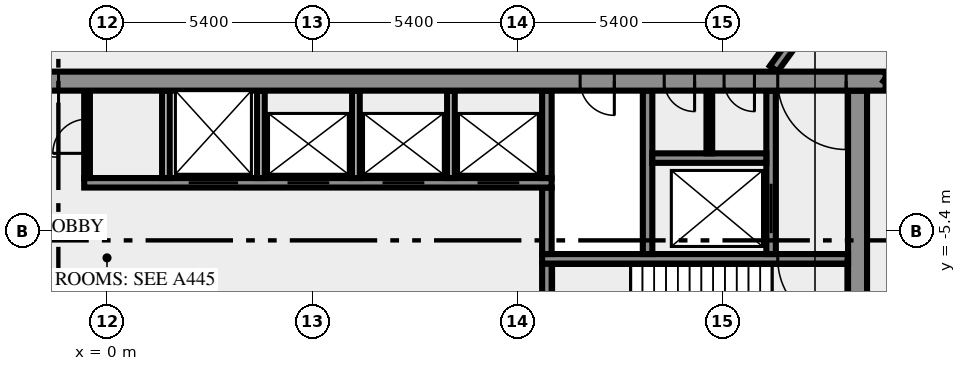
"""IFC4 building model, lengths in metres.
Left out: names, types, materials, properties, quantities, classifications, styles, units other than length and angle.
Written with IfcOpenShell. Run it as: python <this file> out.ifc"""

import sys

from ifc_helpers import new_model, si_unit, direction, frame, frame_2d, origin, place, context, subcontext, project, spatial, rectangle, extrude, element, fill, save


model = new_model("IFC4")
c1 = context("Model", 3, precision=1e-05, world=origin(), true_north=direction((0.0, 1.0)))
c2 = subcontext(c1, "Body", "Model", "MODEL_VIEW")
j1 = project(units=[si_unit("LENGTHUNIT", "METRE"), si_unit("PLANEANGLEUNIT", "RADIAN")], contexts=[c1])
p1 = place(None, origin())
s1 = spatial("IfcSite", under=j1, at=p1, CompositionType="ELEMENT")
p2 = place(p1, origin())
s2 = spatial("IfcBuilding", under=s1, at=p2, CompositionType="ELEMENT")
p3 = place(p2, origin())
s3 = spatial("IfcBuildingStorey", under=s2, at=p3, CompositionType="ELEMENT", Elevation=0.0)
p4 = place(p3, frame((19.75, -11.0, 0.0), z_axis=(0.0, 0.0, 1.0), x_axis=(0.0, 1.0, 0.0)))
e1 = element("IfcWall", 1, at=p4, inside=s3, PredefinedType="SHEAR", context=c2, shape_type="SweptSolid", body=[
    extrude(rectangle(XDim=9.3, YDim=0.5, at=frame_2d((4.65, 0.0))), origin(), (0.0, 0.0, 1.0), 5.6),
])
p5 = place(p3, frame((11.575, -7.25, 0.0), z_axis=(0.0, 0.0, 1.0), x_axis=(0.0, 1.0, 0.0)))
e2 = element("IfcWall", 2, at=p5, inside=s3, PredefinedType="SHEAR", context=c2, shape_type="SweptSolid", body=[
    extrude(rectangle(XDim=1.0, YDim=0.25, at=frame_2d((0.5, 0.0))), origin(), (0.0, 0.0, 1.0), 5.6),
])
p6 = place(p3, frame((19.5, -6.125, 0.0), z_axis=(0.0, 0.0, 1.0), x_axis=(-1.0, 0.0, 0.0)))
e3 = element("IfcWall", 3, at=p6, inside=s3, PredefinedType="SHEAR", context=c2, shape_type="SweptSolid", body=[
    extrude(rectangle(XDim=8.05, YDim=0.25, at=frame_2d((4.025, 0.0))), origin(), (0.0, 0.0, 1.0), 5.6),
])
p7 = place(p6, frame((0.05, 0.0, 0.0)))
e4 = element("IfcOpeningElement", 4, at=p7, cuts=e3, PredefinedType="OPENING", context=c2, shape_type="SweptSolid", body=[
    extrude(rectangle(XDim=1.8, YDim=2.1, at=frame_2d((0.9, 1.05))), frame((0.0, 0.135, 0.0), z_axis=(0.0, -1.0, 0.0), x_axis=(1.0, 0.0, 0.0)), (0.0, 0.0, 1.0), 0.27),
])
p8 = place(p3, frame((11.575, -6.0, 0.0), z_axis=(0.0, 0.0, 1.0), x_axis=(0.0, 1.0, 0.0)))
e5 = element("IfcWall", 5, at=p8, inside=s3, PredefinedType="SHEAR", context=c2, shape_type="SweptSolid", body=[
    extrude(rectangle(XDim=1.75, YDim=0.25, at=frame_2d((0.875, 0.0))), origin(), (0.0, 0.0, 1.0), 5.6),
])
p9 = place(p3, frame((14.225, -6.0, 0.0), z_axis=(0.0, 0.0, 1.0), x_axis=(0.0, 1.0, 0.0)))
e6 = element("IfcWall", 6, at=p9, inside=s3, PredefinedType="SHEAR", context=c2, shape_type="SweptSolid", body=[
    extrude(rectangle(XDim=4.3, YDim=0.25, at=frame_2d((2.15, 0.0))), origin(), (0.0, 0.0, 1.0), 5.6),
])
p10 = place(p3, frame((17.475, -6.0, 0.0), z_axis=(0.0, 0.0, 1.0), x_axis=(0.0, 1.0, 0.0)))
e7 = element("IfcWall", 7, at=p10, inside=s3, PredefinedType="SHEAR", context=c2, shape_type="SweptSolid", body=[
    extrude(rectangle(XDim=4.3, YDim=0.25, at=frame_2d((2.15, 0.0))), origin(), (0.0, 0.0, 1.0), 5.6),
])
p11 = place(p10, frame((0.55, 0.0, 0.0)))
e8 = element("IfcOpeningElement", 8, at=p11, cuts=e7, PredefinedType="OPENING", context=c2, shape_type="SweptSolid", body=[
    extrude(rectangle(XDim=1.3, YDim=2.1, at=frame_2d((0.65, 1.05))), frame((0.0, 0.135, 0.0), z_axis=(0.0, -1.0, 0.0), x_axis=(1.0, 0.0, 0.0)), (0.0, 0.0, 1.0), 0.27),
])
p12 = place(p3, frame((-0.6, -4.125, 0.0), z_axis=(0.0, 0.0, 1.0), x_axis=(1.0, 0.0, 0.0)))
e9 = element("IfcWall", 9, at=p12, inside=s3, PredefinedType="SHEAR", context=c2, shape_type="SweptSolid", body=[
    extrude(rectangle(XDim=12.3, YDim=0.25, at=frame_2d((6.15, 0.0))), origin(), (0.0, 0.0, 1.0), 5.6),
])
p13 = place(p12, frame((2.75, 0.0, 0.0)))
e10 = element("IfcOpeningElement", 10, at=p13, cuts=e9, PredefinedType="OPENING", context=c2, shape_type="SweptSolid", body=[
    extrude(rectangle(XDim=1.3, YDim=2.1, at=frame_2d((0.65, 1.05))), frame((0.0, 0.135, 0.0), z_axis=(0.0, -1.0, 0.0), x_axis=(1.0, 0.0, 0.0)), (0.0, 0.0, 1.0), 0.27),
])
p14 = place(p12, frame((5.35, 0.0, 0.0)))
e11 = element("IfcOpeningElement", 11, at=p14, cuts=e9, PredefinedType="OPENING", context=c2, shape_type="SweptSolid", body=[
    extrude(rectangle(XDim=1.1, YDim=2.1, at=frame_2d((0.55, 1.05))), frame((0.0, 0.135, 0.0), z_axis=(0.0, -1.0, 0.0), x_axis=(1.0, 0.0, 0.0)), (0.0, 0.0, 1.0), 0.27),
])
p15 = place(p12, frame((7.85, 0.0, 0.0)))
e12 = element("IfcOpeningElement", 12, at=p15, cuts=e9, PredefinedType="OPENING", context=c2, shape_type="SweptSolid", body=[
    extrude(rectangle(XDim=1.1, YDim=2.1, at=frame_2d((0.55, 1.05))), frame((0.0, 0.135, 0.0), z_axis=(0.0, -1.0, 0.0), x_axis=(1.0, 0.0, 0.0)), (0.0, 0.0, 1.0), 0.27),
])
p16 = place(p12, frame((10.35, 0.0, 0.0)))
e13 = element("IfcOpeningElement", 13, at=p16, cuts=e9, PredefinedType="OPENING", context=c2, shape_type="SweptSolid", body=[
    extrude(rectangle(XDim=1.1, YDim=2.1, at=frame_2d((0.55, 1.05))), frame((0.0, 0.135, 0.0), z_axis=(0.0, -1.0, 0.0), x_axis=(1.0, 0.0, 0.0)), (0.0, 0.0, 1.0), 0.27),
])
p17 = place(p3, frame((-0.525, -4.0, 0.0), z_axis=(0.0, 0.0, 1.0), x_axis=(0.0, 1.0, 0.0)))
e14 = element("IfcWall", 14, at=p17, inside=s3, PredefinedType="PARTITIONING", context=c2, shape_type="SweptSolid", body=[
    extrude(rectangle(XDim=2.3, YDim=0.15, at=frame_2d((1.15, 0.0))), origin(), (0.0, 0.0, 1.0), 5.6),
])
p18 = place(p17, frame((0.65, 0.0, 0.0)))
e15 = element("IfcOpeningElement", 15, at=p18, cuts=e14, PredefinedType="OPENING", context=c2, shape_type="SweptSolid", body=[
    extrude(rectangle(XDim=0.9, YDim=2.1, at=frame_2d((0.45, 1.05))), frame((0.0, 0.085, 0.0), z_axis=(0.0, -1.0, 0.0), x_axis=(1.0, 0.0, 0.0)), (0.0, 0.0, 1.0), 0.17),
])
for number, where, z_axis, x_axis in (
    (16, (1.55, -4.0, 0.0), (0.0, 0.0, 1.0), (0.0, 1.0, 0.0)),
    (17, (4.05, -4.0, 0.0), (0.0, 0.0, 1.0), (0.0, 1.0, 0.0)),
    (18, (6.55, -4.0, 0.0), (0.0, 0.0, 1.0), (0.0, 1.0, 0.0)),
    (19, (9.05, -4.0, 0.0), (0.0, 0.0, 1.0), (0.0, 1.0, 0.0)),
):
    element("IfcWall", number, at=place(p3, frame(where, z_axis=z_axis, x_axis=x_axis)), inside=s3, PredefinedType="SOLIDWALL", context=c2, shape_type="SweptSolid", body=[
        extrude(rectangle(XDim=2.3, YDim=0.2, at=frame_2d((1.15, 0.0))), origin(), (0.0, 0.0, 1.0), 5.6),
    ])
p19 = place(p3, frame((11.575, -4.0, 0.0), z_axis=(0.0, 0.0, 1.0), x_axis=(0.0, 1.0, 0.0)))
e20 = element("IfcWall", 20, at=p19, inside=s3, PredefinedType="SHEAR", context=c2, shape_type="SweptSolid", body=[
    extrude(rectangle(XDim=2.3, YDim=0.25, at=frame_2d((1.15, 0.0))), origin(), (0.0, 0.0, 1.0), 5.6),
])
p20 = place(p3, frame((14.35, -3.475, 0.0), z_axis=(0.0, 0.0, 1.0), x_axis=(1.0, 0.0, 0.0)))
e21 = element("IfcWall", 21, at=p20, inside=s3, PredefinedType="SHEAR", context=c2, shape_type="SweptSolid", body=[
    extrude(rectangle(XDim=3.0, YDim=0.25, at=frame_2d((1.5, 0.0))), origin(), (0.0, 0.0, 1.0), 5.6),
])
p21 = place(p3, frame((15.85, -3.35, 0.0), z_axis=(0.0, 0.0, 1.0), x_axis=(0.0, 1.0, 0.0)))
e22 = element("IfcWall", 22, at=p21, inside=s3, PredefinedType="PARTITIONING", context=c2, shape_type="SweptSolid", body=[
    extrude(rectangle(XDim=1.65, YDim=0.15, at=frame_2d((0.825, 0.0))), origin(), (0.0, 0.0, 1.0), 5.6),
])
p22 = place(p3, frame((20.49, -1.45, 0.0), z_axis=(0.0, 0.0, 1.0), x_axis=(-1.0, 0.0, 0.0)))
e23 = element("IfcWall", 23, at=p22, inside=s3, PredefinedType="SHEAR", context=c2, shape_type="SweptSolid", body=[
    extrude(rectangle(XDim=40.98, YDim=0.5, at=frame_2d((20.49, 0.0))), origin(), (0.0, 0.0, 1.0), 5.6),
])
p23 = place(p22, frame((38.14, 0.0, 0.0)))
e24 = element("IfcOpeningElement", 24, at=p23, cuts=e23, PredefinedType="OPENING", context=c2, shape_type="SweptSolid", body=[
    extrude(rectangle(XDim=1.8, YDim=2.1, at=frame_2d((0.9, 1.05))), frame((0.0, 0.26, 0.0), z_axis=(0.0, -1.0, 0.0), x_axis=(1.0, 0.0, 0.0)), (0.0, 0.0, 1.0), 0.52),
])
p24 = place(p22, frame((35.89, 0.0, 0.0)))
e25 = element("IfcOpeningElement", 25, at=p24, cuts=e23, PredefinedType="OPENING", context=c2, shape_type="SweptSolid", body=[
    extrude(rectangle(XDim=0.9, YDim=2.1, at=frame_2d((0.45, 1.05))), frame((0.0, 0.26, 0.0), z_axis=(0.0, -1.0, 0.0), x_axis=(1.0, 0.0, 0.0)), (0.0, 0.0, 1.0), 0.52),
])
p25 = place(p22, frame((32.94, 0.0, 0.0)))
e26 = element("IfcOpeningElement", 26, at=p25, cuts=e23, PredefinedType="OPENING", context=c2, shape_type="SweptSolid", body=[
    extrude(rectangle(XDim=0.9, YDim=2.1, at=frame_2d((0.45, 1.05))), frame((0.0, 0.26, 0.0), z_axis=(0.0, -1.0, 0.0), x_axis=(1.0, 0.0, 0.0)), (0.0, 0.0, 1.0), 0.52),
])
p26 = place(p22, frame((21.765, 0.0, 0.0)))
e27 = element("IfcOpeningElement", 27, at=p26, cuts=e23, PredefinedType="OPENING", context=c2, shape_type="SweptSolid", body=[
    extrude(rectangle(XDim=2.0, YDim=2.1, at=frame_2d((1.0, 1.05))), frame((0.0, 0.26, 0.0), z_axis=(0.0, -1.0, 0.0), x_axis=(1.0, 0.0, 0.0)), (0.0, 0.0, 1.0), 0.52),
])
p27 = place(p22, frame((7.14, 0.0, 0.0)))
e28 = element("IfcOpeningElement", 28, at=p27, cuts=e23, PredefinedType="OPENING", context=c2, shape_type="SweptSolid", body=[
    extrude(rectangle(XDim=0.9, YDim=2.1, at=frame_2d((0.45, 1.05))), frame((0.0, 0.26, 0.0), z_axis=(0.0, -1.0, 0.0), x_axis=(1.0, 0.0, 0.0)), (0.0, 0.0, 1.0), 0.52),
])
p28 = place(p22, frame((5.028, 0.0, 0.0)))
e29 = element("IfcOpeningElement", 29, at=p28, cuts=e23, PredefinedType="OPENING", context=c2, shape_type="SweptSolid", body=[
    extrude(rectangle(XDim=0.8, YDim=2.1, at=frame_2d((0.4, 1.05))), frame((0.0, 0.26, 0.0), z_axis=(0.0, -1.0, 0.0), x_axis=(1.0, 0.0, 0.0)), (0.0, 0.0, 1.0), 0.52),
])
p29 = place(p22, frame((3.452, 0.0, 0.0)))
e30 = element("IfcOpeningElement", 30, at=p29, cuts=e23, PredefinedType="OPENING", context=c2, shape_type="SweptSolid", body=[
    extrude(rectangle(XDim=0.8, YDim=2.1, at=frame_2d((0.4, 1.05))), frame((0.0, 0.26, 0.0), z_axis=(0.0, -1.0, 0.0), x_axis=(1.0, 0.0, 0.0)), (0.0, 0.0, 1.0), 0.52),
])
p30 = place(p22, frame((1.04, 0.0, 0.0)))
e31 = element("IfcOpeningElement", 31, at=p30, cuts=e23, PredefinedType="OPENING", context=c2, shape_type="SweptSolid", body=[
    extrude(rectangle(XDim=1.8, YDim=2.1, at=frame_2d((0.9, 1.05))), frame((0.0, 0.26, 0.0), z_axis=(0.0, -1.0, 0.0), x_axis=(1.0, 0.0, 0.0)), (0.0, 0.0, 1.0), 0.52),
])
p31 = place(p3, frame((49.869, 38.856, 0.0), z_axis=(0.0, 0.0, 1.0), x_axis=(-0.587784522481, -0.809017524614, 0.0)))
e32 = element("IfcWall", 32, at=p31, inside=s3, PredefinedType="SOLIDWALL", context=c2, shape_type="SweptSolid", body=[
    extrude(rectangle(XDim=49.912, YDim=0.25, at=frame_2d((24.956, 0.0))), origin(), (0.0, 0.0, 1.0), 5.6),
])
p32 = place(p31, frame((38.497, 0.0, 0.0)))
e33 = element("IfcOpeningElement", 33, at=p32, cuts=e32, PredefinedType="OPENING", context=c2, shape_type="SweptSolid", body=[
    extrude(rectangle(XDim=0.9, YDim=2.1, at=frame_2d((0.45, 1.05))), frame((0.0, 0.135, 0.0), z_axis=(0.0, -1.0, 0.0), x_axis=(1.0, 0.0, 0.0)), (0.0, 0.0, 1.0), 0.27),
])
p33 = place(p31, frame((0.442, 0.0, 0.0)))
e34 = element("IfcOpeningElement", 34, at=p33, cuts=e32, PredefinedType="OPENING", context=c2, shape_type="SweptSolid", body=[
    extrude(rectangle(XDim=0.9, YDim=2.1, at=frame_2d((0.45, 1.05))), frame((0.0, 0.135, 0.0), z_axis=(0.0, -1.0, 0.0), x_axis=(1.0, 0.0, 0.0)), (0.0, 0.0, 1.0), 0.27),
])
p34 = place(p31, frame((23.322, 0.0, 0.0)))
e35 = element("IfcOpeningElement", 35, at=p34, cuts=e32, PredefinedType="OPENING", context=c2, shape_type="SweptSolid", body=[
    extrude(rectangle(XDim=1.8, YDim=2.1, at=frame_2d((0.9, 1.05))), frame((0.0, 0.135, 0.0), z_axis=(0.0, -1.0, 0.0), x_axis=(1.0, 0.0, 0.0)), (0.0, 0.0, 1.0), 0.27),
])
p35 = place(p31, frame((48.479, 0.0, 0.0)))
e36 = element("IfcOpeningElement", 36, at=p35, cuts=e32, PredefinedType="OPENING", context=c2, shape_type="SweptSolid", body=[
    extrude(rectangle(XDim=0.9, YDim=2.1, at=frame_2d((0.45, 1.05))), frame((0.0, 0.135, 0.0), z_axis=(0.0, -1.0, 0.0), x_axis=(1.0, 0.0, 0.0)), (0.0, 0.0, 1.0), 0.27),
])
p36 = place(p3, frame((17.545, -1.125, 0.0), z_axis=(0.0, 0.0, 1.0), x_axis=(0.587786323093, 0.809016216391, 0.0)))
e37 = element("IfcWall", 37, at=p36, inside=s3, PredefinedType="SOLIDWALL", context=c2, shape_type="SweptSolid", body=[
    extrude(rectangle(XDim=33.493, YDim=0.25, at=frame_2d((16.747, 0.0))), origin(), (0.0, 0.0, 1.0), 5.6),
])
p37 = place(p36, frame((22.583, 0.0, 0.0)))
e38 = element("IfcOpeningElement", 38, at=p37, cuts=e37, PredefinedType="OPENING", context=c2, shape_type="SweptSolid", body=[
    extrude(rectangle(XDim=1.8, YDim=2.1, at=frame_2d((0.9, 1.05))), frame((0.0, 0.135, 0.0), z_axis=(0.0, -1.0, 0.0), x_axis=(1.0, 0.0, 0.0)), (0.0, 0.0, 1.0), 0.27),
])
p38 = place(p36, frame((14.807, 0.0, 0.0)))
e39 = element("IfcOpeningElement", 39, at=p38, cuts=e37, PredefinedType="OPENING", context=c2, shape_type="SweptSolid", body=[
    extrude(rectangle(XDim=0.9, YDim=2.1, at=frame_2d((0.45, 1.05))), frame((0.0, 0.135, 0.0), z_axis=(0.0, -1.0, 0.0), x_axis=(1.0, 0.0, 0.0)), (0.0, 0.0, 1.0), 0.27),
])
p39 = place(p36, frame((32.253, 0.0, 0.0)))
e40 = element("IfcOpeningElement", 40, at=p39, cuts=e37, PredefinedType="OPENING", context=c2, shape_type="SweptSolid", body=[
    extrude(rectangle(XDim=0.9, YDim=2.1, at=frame_2d((0.45, 1.05))), frame((0.0, 0.135, 0.0), z_axis=(0.0, -1.0, 0.0), x_axis=(1.0, 0.0, 0.0)), (0.0, 0.0, 1.0), 0.27),
])
p40 = place(p7, origin())
e41 = element("IfcDoor", 41, at=p40, inside=s3, OperationType="DOUBLE_DOOR_SINGLE_SWING", PredefinedType="DOOR", context=c2, shape_type="SweptSolid", body=[
    extrude(rectangle(XDim=1.8, YDim=2.1, at=frame_2d((0.9, 1.05))), frame((0.0, 0.025, 0.0), z_axis=(0.0, -1.0, 0.0), x_axis=(1.0, 0.0, 0.0)), (0.0, 0.0, 1.0), 0.05),
])
fill(e4, e41)
p41 = place(p11, origin())
e42 = element("IfcDoor", 42, at=p41, inside=s3, OperationType="DOUBLE_DOOR_SLIDING", PredefinedType="DOOR", context=c2, shape_type="SweptSolid", body=[
    extrude(rectangle(XDim=1.3, YDim=2.1, at=frame_2d((0.65, 1.05))), frame((0.0, 0.025, 0.0), z_axis=(0.0, -1.0, 0.0), x_axis=(1.0, 0.0, 0.0)), (0.0, 0.0, 1.0), 0.05),
])
fill(e8, e42)
p42 = place(p13, origin())
e43 = element("IfcDoor", 43, at=p42, inside=s3, OperationType="DOUBLE_DOOR_SLIDING", PredefinedType="DOOR", context=c2, shape_type="SweptSolid", body=[
    extrude(rectangle(XDim=1.3, YDim=2.1, at=frame_2d((0.65, 1.05))), frame((0.0, 0.025, 0.0), z_axis=(0.0, -1.0, 0.0), x_axis=(1.0, 0.0, 0.0)), (0.0, 0.0, 1.0), 0.05),
])
fill(e10, e43)
p43 = place(p14, origin())
e44 = element("IfcDoor", 44, at=p43, inside=s3, OperationType="DOUBLE_DOOR_SLIDING", PredefinedType="DOOR", context=c2, shape_type="SweptSolid", body=[
    extrude(rectangle(XDim=1.1, YDim=2.1, at=frame_2d((0.55, 1.05))), frame((0.0, 0.025, 0.0), z_axis=(0.0, -1.0, 0.0), x_axis=(1.0, 0.0, 0.0)), (0.0, 0.0, 1.0), 0.05),
])
fill(e11, e44)
p44 = place(p15, origin())
e45 = element("IfcDoor", 45, at=p44, inside=s3, OperationType="DOUBLE_DOOR_SLIDING", PredefinedType="DOOR", context=c2, shape_type="SweptSolid", body=[
    extrude(rectangle(XDim=1.1, YDim=2.1, at=frame_2d((0.55, 1.05))), frame((0.0, 0.025, 0.0), z_axis=(0.0, -1.0, 0.0), x_axis=(1.0, 0.0, 0.0)), (0.0, 0.0, 1.0), 0.05),
])
fill(e12, e45)
p45 = place(p16, origin())
e46 = element("IfcDoor", 46, at=p45, inside=s3, OperationType="DOUBLE_DOOR_SLIDING", PredefinedType="DOOR", context=c2, shape_type="SweptSolid", body=[
    extrude(rectangle(XDim=1.1, YDim=2.1, at=frame_2d((0.55, 1.05))), frame((0.0, 0.025, 0.0), z_axis=(0.0, -1.0, 0.0), x_axis=(1.0, 0.0, 0.0)), (0.0, 0.0, 1.0), 0.05),
])
fill(e13, e46)
p46 = place(p18, origin())
e47 = element("IfcDoor", 47, at=p46, inside=s3, OperationType="SINGLE_SWING_LEFT", PredefinedType="DOOR", context=c2, shape_type="SweptSolid", body=[
    extrude(rectangle(XDim=0.9, YDim=2.1, at=frame_2d((0.45, 1.05))), frame((0.0, 0.025, 0.0), z_axis=(0.0, -1.0, 0.0), x_axis=(1.0, 0.0, 0.0)), (0.0, 0.0, 1.0), 0.05),
])
fill(e15, e47)
p47 = place(p26, origin())
e48 = element("IfcDoor", 48, at=p47, inside=s3, OperationType="DOUBLE_DOOR_SINGLE_SWING", PredefinedType="DOOR", context=c2, shape_type="SweptSolid", body=[
    extrude(rectangle(XDim=2.0, YDim=2.1, at=frame_2d((1.0, 1.05))), frame((0.0, 0.025, 0.0), z_axis=(0.0, -1.0, 0.0), x_axis=(1.0, 0.0, 0.0)), (0.0, 0.0, 1.0), 0.05),
])
fill(e27, e48)
p48 = place(p27, origin())
e49 = element("IfcDoor", 49, at=p48, inside=s3, OperationType="SINGLE_SWING_LEFT", PredefinedType="DOOR", context=c2, shape_type="SweptSolid", body=[
    extrude(rectangle(XDim=0.9, YDim=2.1, at=frame_2d((0.45, 1.05))), frame((0.0, 0.025, 0.0), z_axis=(0.0, -1.0, 0.0), x_axis=(1.0, 0.0, 0.0)), (0.0, 0.0, 1.0), 0.05),
])
fill(e28, e49)
p49 = place(p28, origin())
e50 = element("IfcDoor", 50, at=p49, inside=s3, OperationType="SINGLE_SWING_LEFT", PredefinedType="DOOR", context=c2, shape_type="SweptSolid", body=[
    extrude(rectangle(XDim=0.8, YDim=2.1, at=frame_2d((0.4, 1.05))), frame((0.0, 0.025, 0.0), z_axis=(0.0, -1.0, 0.0), x_axis=(1.0, 0.0, 0.0)), (0.0, 0.0, 1.0), 0.05),
])
fill(e29, e50)
p50 = place(p29, origin())
e51 = element("IfcDoor", 51, at=p50, inside=s3, OperationType="SINGLE_SWING_LEFT", PredefinedType="DOOR", context=c2, shape_type="SweptSolid", body=[
    extrude(rectangle(XDim=0.8, YDim=2.1, at=frame_2d((0.4, 1.05))), frame((0.0, 0.025, 0.0), z_axis=(0.0, -1.0, 0.0), x_axis=(1.0, 0.0, 0.0)), (0.0, 0.0, 1.0), 0.05),
])
fill(e30, e51)
p51 = place(p30, origin())
e52 = element("IfcDoor", 52, at=p51, inside=s3, OperationType="DOUBLE_DOOR_SINGLE_SWING", PredefinedType="DOOR", context=c2, shape_type="SweptSolid", body=[
    extrude(rectangle(XDim=1.8, YDim=2.1, at=frame_2d((0.9, 1.05))), frame((0.0, 0.025, 0.0), z_axis=(0.0, -1.0, 0.0), x_axis=(1.0, 0.0, 0.0)), (0.0, 0.0, 1.0), 0.05),
])
fill(e31, e52)
save(model, sys.argv[1])
